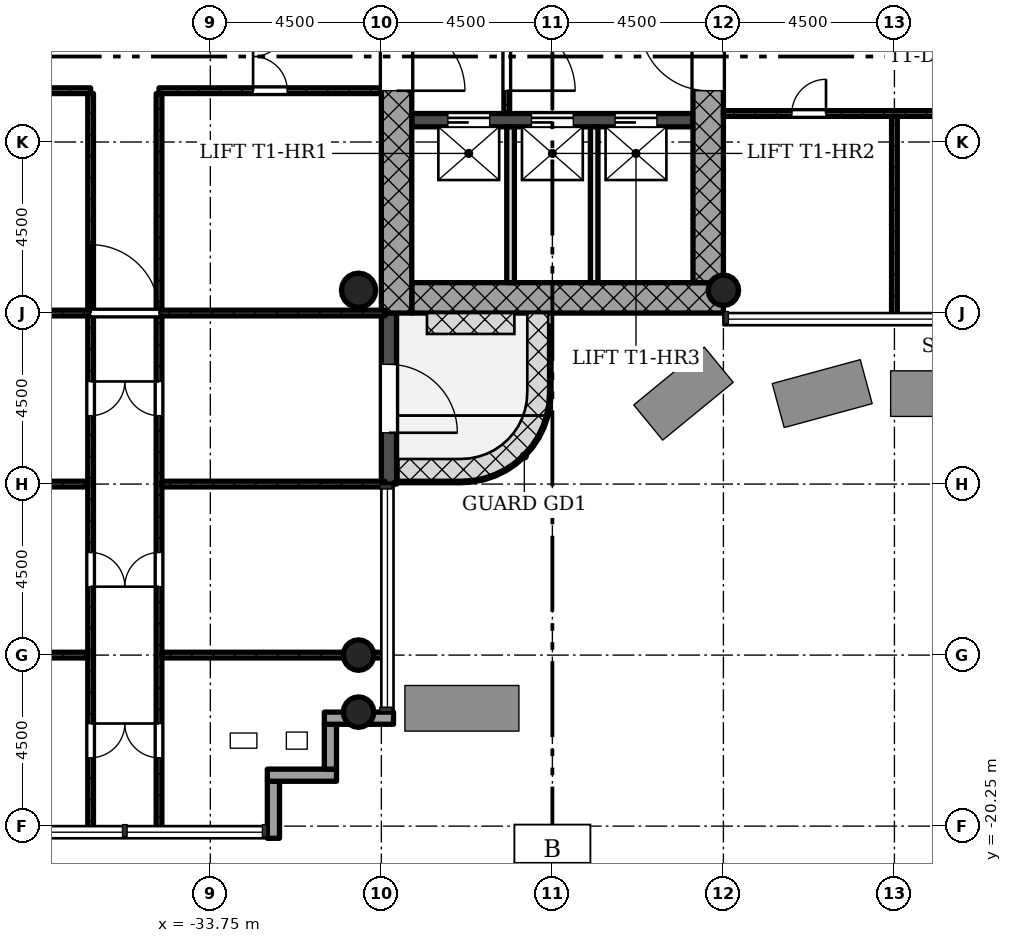
"""IFC4 building model, lengths in metres.
Left out: names, types, materials, properties, quantities, classifications, styles, units other than length and angle.
Written with IfcOpenShell. Run it as: python <this file> out.ifc"""

import sys

from ifc_helpers import new_model, si_unit, direction, frame, frame_2d, origin, origin_2d, place, context, subcontext, project, spatial, rectangle, hollow_circle, extrude, element, fill, save


model = new_model("IFC4")
c1 = context("Model", 3, precision=1e-05, world=origin(), true_north=direction((0.0, 1.0)))
c2 = subcontext(c1, "Body", "Model", "MODEL_VIEW")
j1 = project(units=[si_unit("LENGTHUNIT", "METRE"), si_unit("PLANEANGLEUNIT", "RADIAN")], contexts=[c1])
p1 = place(None, origin())
s1 = spatial("IfcSite", under=j1, at=p1, CompositionType="ELEMENT")
p2 = place(p1, origin())
s2 = spatial("IfcBuilding", under=s1, at=p2, CompositionType="ELEMENT")
p3 = place(p2, frame((0.0, 0.0, 128.7)))
s3 = spatial("IfcBuildingStorey", under=s2, at=p3, CompositionType="ELEMENT", Elevation=128.7)
p4 = place(p3, frame((-28.45, -6.35, 0.0), z_axis=(0.0, 0.0, 1.0), x_axis=(1.0, 0.0, 0.0)))
e1 = element("IfcWall", 1, at=p4, inside=s3, PredefinedType="SHEAR", context=c2, shape_type="SweptSolid", body=[
    extrude(rectangle(XDim=8.2, YDim=0.8, at=frame_2d((4.1, 0.0))), origin(), (0.0, 0.0, 1.0), 5.0),
])
p5 = place(p3, frame((-20.65, -5.95, 0.0), z_axis=(0.0, 0.0, 1.0), x_axis=(0.0, 1.0, 0.0)))
e2 = element("IfcWall", 2, at=p5, inside=s3, PredefinedType="SHEAR", context=c2, shape_type="SweptSolid", body=[
    extrude(rectangle(XDim=12.7, YDim=0.8, at=frame_2d((6.35, 0.0))), origin(), (0.0, 0.0, 1.0), 5.0),
])
p6 = place(p5, frame((5.05, 0.0, 0.0)))
e3 = element("IfcOpeningElement", 3, at=p6, cuts=e2, PredefinedType="OPENING", context=c2, shape_type="SweptSolid", body=[
    extrude(rectangle(XDim=1.8, YDim=2.1, at=frame_2d((0.9, 1.05))), frame((0.0, 0.41, 0.0), z_axis=(0.0, -1.0, 0.0), x_axis=(1.0, 0.0, 0.0)), (0.0, 0.0, 1.0), 0.82),
])
p7 = place(p3, frame((-28.85, 5.95, 0.0), z_axis=(0.0, 0.0, 1.0), x_axis=(0.0, -1.0, 0.0)))
e4 = element("IfcWall", 4, at=p7, inside=s3, PredefinedType="SHEAR", context=c2, shape_type="SweptSolid", body=[
    extrude(rectangle(XDim=12.7, YDim=0.8, at=frame_2d((6.35, 0.0))), origin(), (0.0, 0.0, 1.0), 5.0),
])
p8 = place(p7, frame((5.05, 0.0, 0.0)))
e5 = element("IfcOpeningElement", 5, at=p8, cuts=e4, PredefinedType="OPENING", context=c2, shape_type="SweptSolid", body=[
    extrude(rectangle(XDim=1.8, YDim=2.1, at=frame_2d((0.9, 1.05))), frame((0.0, 0.41, 0.0), z_axis=(0.0, -1.0, 0.0), x_axis=(1.0, 0.0, 0.0)), (0.0, 0.0, 1.0), 0.82),
])
p9 = place(p3, frame((-28.45, -1.675, 0.0), z_axis=(0.0, 0.0, 1.0), x_axis=(1.0, 0.0, 0.0)))
e6 = element("IfcWall", 6, at=p9, inside=s3, PredefinedType="SHEAR", context=c2, shape_type="SweptSolid", body=[
    extrude(rectangle(XDim=7.4, YDim=0.35, at=frame_2d((3.7, 0.0))), origin(), (0.0, 0.0, 1.0), 5.0),
])
p10 = place(p9, frame((0.95, 0.0, 0.0)))
e7 = element("IfcOpeningElement", 7, at=p10, cuts=e6, PredefinedType="OPENING", context=c2, shape_type="SweptSolid", body=[
    extrude(rectangle(XDim=1.1, YDim=2.1, at=frame_2d((0.55, 1.05))), frame((0.0, 0.185, 0.0), z_axis=(0.0, -1.0, 0.0), x_axis=(1.0, 0.0, 0.0)), (0.0, 0.0, 1.0), 0.37),
])
p11 = place(p9, frame((3.15, 0.0, 0.0)))
e8 = element("IfcOpeningElement", 8, at=p11, cuts=e6, PredefinedType="OPENING", context=c2, shape_type="SweptSolid", body=[
    extrude(rectangle(XDim=1.1, YDim=2.1, at=frame_2d((0.55, 1.05))), frame((0.0, 0.185, 0.0), z_axis=(0.0, -1.0, 0.0), x_axis=(1.0, 0.0, 0.0)), (0.0, 0.0, 1.0), 0.37),
])
p12 = place(p9, frame((5.35, 0.0, 0.0)))
e9 = element("IfcOpeningElement", 9, at=p12, cuts=e6, PredefinedType="OPENING", context=c2, shape_type="SweptSolid", body=[
    extrude(rectangle(XDim=1.1, YDim=2.1, at=frame_2d((0.55, 1.05))), frame((0.0, 0.185, 0.0), z_axis=(0.0, -1.0, 0.0), x_axis=(1.0, 0.0, 0.0)), (0.0, 0.0, 1.0), 0.37),
])
for number, where, z_axis, x_axis in (
    (10, (-20.25, -6.15, 0.0), (0.0, 0.0, 1.0), (1.0, 0.0, 0.0)),
    (11, (-29.85, -15.75, 0.0), (0.0, 0.0, 1.0), (1.0, 0.0, 0.0)),
    (12, (-29.85, -17.25, 0.0), (0.0, 0.0, 1.0), (1.0, 0.0, 0.0)),
):
    element("IfcColumn", number, at=place(p3, frame(where, z_axis=z_axis, x_axis=x_axis)), inside=s3, PredefinedType="COLUMN", context=c2, shape_type="SweptSolid", body=[
        extrude(hollow_circle(Radius=0.4, WallThickness=0.028, at=origin_2d()), origin(), (0.0, 0.0, 1.0), 5.0),
    ])
p13 = place(p3, frame((-29.85, -6.15, 0.0), z_axis=(0.0, 0.0, 1.0), x_axis=(1.0, 0.0, 0.0)))
e13 = element("IfcColumn", 13, at=p13, inside=s3, PredefinedType="COLUMN", context=c2, shape_type="SweptSolid", body=[
    extrude(hollow_circle(Radius=0.45, WallThickness=0.032, at=origin_2d()), origin(), (0.0, 0.0, 1.0), 5.0),
])
p14 = place(p3, frame((-32.09, -20.57, -0.3), z_axis=(0.0, 0.0, 1.0), x_axis=(0.0, 1.0, 0.0)))
e14 = element("IfcWall", 14, at=p14, inside=s3, PredefinedType="STANDARD", context=c2, shape_type="SweptSolid", body=[
    extrude(rectangle(XDim=1.5, YDim=0.32, at=frame_2d((0.75, 0.0))), origin(), (0.0, 0.0, 1.0), 5.0),
])
p15 = place(p3, frame((-32.25, -18.91, -0.3), z_axis=(0.0, 0.0, 1.0), x_axis=(1.0, 0.0, 0.0)))
e15 = element("IfcWall", 15, at=p15, inside=s3, PredefinedType="STANDARD", context=c2, shape_type="SweptSolid", body=[
    extrude(rectangle(XDim=1.82, YDim=0.32, at=frame_2d((0.91, 0.0))), origin(), (0.0, 0.0, 1.0), 5.0),
])
p16 = place(p3, frame((-30.59, -18.75, -0.3), z_axis=(0.0, 0.0, 1.0), x_axis=(0.0, 1.0, 0.0)))
e16 = element("IfcWall", 16, at=p16, inside=s3, PredefinedType="STANDARD", context=c2, shape_type="SweptSolid", body=[
    extrude(rectangle(XDim=1.18, YDim=0.32, at=frame_2d((0.59, 0.0))), origin(), (0.0, 0.0, 1.0), 5.0),
])
p17 = place(p3, frame((-30.75, -17.41, -0.3), z_axis=(0.0, 0.0, 1.0), x_axis=(1.0, 0.0, 0.0)))
e17 = element("IfcWall", 17, at=p17, inside=s3, PredefinedType="STANDARD", context=c2, shape_type="SweptSolid", body=[
    extrude(rectangle(XDim=1.82, YDim=0.32, at=frame_2d((0.91, 0.0))), origin(), (0.0, 0.0, 1.0), 5.0),
])
p18 = place(p3, frame((-29.05, -11.25, -0.02), z_axis=(0.0, 0.0, 1.0), x_axis=(0.0, 1.0, 0.0)))
e18 = element("IfcWall", 18, at=p18, inside=s3, PredefinedType="STANDARD", context=c2, shape_type="SweptSolid", body=[
    extrude(rectangle(XDim=4.5, YDim=0.4, at=frame_2d((2.25, 0.0))), origin(), (0.0, 0.0, 1.0), 4.72),
])
p19 = place(p18, frame((1.35, 0.0, 0.02)))
e19 = element("IfcOpeningElement", 19, at=p19, cuts=e18, PredefinedType="OPENING", context=c2, shape_type="SweptSolid", body=[
    extrude(rectangle(XDim=1.8, YDim=2.1, at=frame_2d((0.9, 1.05))), frame((0.0, 0.21, 0.0), z_axis=(0.0, -1.0, 0.0), x_axis=(1.0, 0.0, 0.0)), (0.0, 0.0, 1.0), 0.42),
])
p20 = place(p3, frame((-25.95, -1.5, 0.0), z_axis=(0.0, 0.0, 1.0), x_axis=(0.0, 1.0, 0.0)))
e20 = element("IfcWall", 20, at=p20, inside=s3, PredefinedType="PARTITIONING", context=c2, shape_type="SweptSolid", body=[
    extrude(rectangle(XDim=3.0, YDim=0.15, at=frame_2d((1.5, 0.0))), origin(), (0.0, 0.0, 1.0), 4.58),
])
p21 = place(p20, frame((0.6, 0.0, 0.0)))
e21 = element("IfcOpeningElement", 21, at=p21, cuts=e20, PredefinedType="OPENING", context=c2, shape_type="SweptSolid", body=[
    extrude(rectangle(XDim=1.8, YDim=2.1, at=frame_2d((0.9, 1.05))), frame((0.0, 0.085, 0.0), z_axis=(0.0, -1.0, 0.0), x_axis=(1.0, 0.0, 0.0)), (0.0, 0.0, 1.0), 0.17),
])
for number, where, z_axis, x_axis in (
    (22, (-25.85, -5.95, 0.0), (0.0, 0.0, 1.0), (0.0, 1.0, 0.0)),
    (23, (-23.65, -5.95, 0.0), (0.0, 0.0, 1.0), (0.0, 1.0, 0.0)),
):
    element("IfcWall", number, at=place(p3, frame(where, z_axis=z_axis, x_axis=x_axis)), inside=s3, PredefinedType="SOLIDWALL", context=c2, shape_type="SweptSolid", body=[
        extrude(rectangle(XDim=4.1, YDim=0.2, at=frame_2d((2.05, 0.0))), origin(), (0.0, 0.0, 1.0), 4.58),
    ])
p22 = place(p3, frame((-35.1, -0.9, 0.0), z_axis=(0.0, 0.0, 1.0), x_axis=(1.0, 0.0, 0.0)))
e24 = element("IfcWall", 24, at=p22, inside=s3, PredefinedType="PARTITIONING", context=c2, shape_type="SweptSolid", body=[
    extrude(rectangle(XDim=5.85, YDim=0.15, at=frame_2d((2.925, 0.0))), origin(), (0.0, 0.0, 1.0), 4.58),
])
p23 = place(p22, frame((2.475, 0.0, 0.0)))
e25 = element("IfcOpeningElement", 25, at=p23, cuts=e24, PredefinedType="OPENING", context=c2, shape_type="SweptSolid", body=[
    extrude(rectangle(XDim=0.9, YDim=2.1, at=frame_2d((0.45, 1.05))), frame((0.0, 0.085, 0.0), z_axis=(0.0, -1.0, 0.0), x_axis=(1.0, 0.0, 0.0)), (0.0, 0.0, 1.0), 0.17),
])
p24 = place(p3, frame((-35.1, -6.675, 0.0), z_axis=(0.0, 0.0, 1.0), x_axis=(0.0, 1.0, 0.0)))
e26 = element("IfcWall", 26, at=p24, inside=s3, PredefinedType="PARTITIONING", context=c2, shape_type="SweptSolid", body=[
    extrude(rectangle(XDim=5.7, YDim=0.15, at=frame_2d((2.85, 0.0))), origin(), (0.0, 0.0, 1.0), 4.58),
])
p25 = place(p3, frame((-42.75, -0.9, 0.0), z_axis=(0.0, 0.0, 1.0), x_axis=(1.0, 0.0, 0.0)))
e27 = element("IfcWall", 27, at=p25, inside=s3, PredefinedType="PARTITIONING", context=c2, shape_type="SweptSolid", body=[
    extrude(rectangle(XDim=5.85, YDim=0.15, at=frame_2d((2.925, 0.0))), origin(), (0.0, 0.0, 1.0), 4.58),
])
p26 = place(p25, frame((2.475, 0.0, 0.0)))
e28 = element("IfcOpeningElement", 28, at=p26, cuts=e27, PredefinedType="OPENING", context=c2, shape_type="SweptSolid", body=[
    extrude(rectangle(XDim=0.9, YDim=2.1, at=frame_2d((0.45, 1.05))), frame((0.0, 0.085, 0.0), z_axis=(0.0, -1.0, 0.0), x_axis=(1.0, 0.0, 0.0)), (0.0, 0.0, 1.0), 0.17),
])
p27 = place(p3, frame((-36.9, -6.675, 0.0), z_axis=(0.0, 0.0, 1.0), x_axis=(0.0, 1.0, 0.0)))
e29 = element("IfcWall", 29, at=p27, inside=s3, PredefinedType="PARTITIONING", context=c2, shape_type="SweptSolid", body=[
    extrude(rectangle(XDim=5.7, YDim=0.15, at=frame_2d((2.85, 0.0))), origin(), (0.0, 0.0, 1.0), 4.58),
])
p28 = place(p3, frame((-20.25, -1.5, 0.0), z_axis=(0.0, 0.0, 1.0), x_axis=(1.0, 0.0, 0.0)))
e30 = element("IfcWall", 30, at=p28, inside=s3, PredefinedType="PARTITIONING", context=c2, shape_type="SweptSolid", body=[
    extrude(rectangle(XDim=9.1, YDim=0.15, at=frame_2d((4.55, 0.0))), origin(), (0.0, 0.0, 1.0), 4.58),
])
p29 = place(p28, frame((1.8, 0.0, 0.0)))
e31 = element("IfcOpeningElement", 31, at=p29, cuts=e30, PredefinedType="OPENING", context=c2, shape_type="SweptSolid", body=[
    extrude(rectangle(XDim=0.9, YDim=2.1, at=frame_2d((0.45, 1.05))), frame((0.0, 0.085, 0.0), z_axis=(0.0, -1.0, 0.0), x_axis=(1.0, 0.0, 0.0)), (0.0, 0.0, 1.0), 0.17),
])
p30 = place(p28, frame((6.3, 0.0, 0.0)))
e32 = element("IfcOpeningElement", 32, at=p30, cuts=e30, PredefinedType="OPENING", context=c2, shape_type="SweptSolid", body=[
    extrude(rectangle(XDim=0.9, YDim=2.1, at=frame_2d((0.45, 1.05))), frame((0.0, 0.085, 0.0), z_axis=(0.0, -1.0, 0.0), x_axis=(1.0, 0.0, 0.0)), (0.0, 0.0, 1.0), 0.17),
])
p31 = place(p3, frame((-15.75, -1.575, 0.0), z_axis=(0.0, 0.0, 1.0), x_axis=(0.0, -1.0, 0.0)))
e33 = element("IfcWall", 33, at=p31, inside=s3, PredefinedType="PARTITIONING", context=c2, shape_type="SweptSolid", body=[
    extrude(rectangle(XDim=5.275, YDim=0.15, at=frame_2d((2.638, 0.0))), origin(), (0.0, 0.0, 1.0), 4.58),
])
p32 = place(p3, frame((-42.85, -6.75, 0.0), z_axis=(0.0, 0.0, 1.0), x_axis=(1.0, 0.0, 0.0)))
e34 = element("IfcWall", 34, at=p32, inside=s3, PredefinedType="PARTITIONING", context=c2, shape_type="SweptSolid", body=[
    extrude(rectangle(XDim=13.7, YDim=0.15, at=frame_2d((6.85, 0.0))), origin(), (0.0, 0.0, 1.0), 4.58),
])
p33 = place(p32, frame((5.95, 0.0, 0.0)))
e35 = element("IfcOpeningElement", 35, at=p33, cuts=e34, PredefinedType="OPENING", context=c2, shape_type="SweptSolid", body=[
    extrude(rectangle(XDim=1.8, YDim=2.1, at=frame_2d((0.9, 1.05))), frame((0.0, 0.085, 0.0), z_axis=(0.0, -1.0, 0.0), x_axis=(1.0, 0.0, 0.0)), (0.0, 0.0, 1.0), 0.17),
])
p34 = place(p3, frame((-35.1, -20.35, 0.0), z_axis=(0.0, 0.0, 1.0), x_axis=(0.0, 1.0, 0.0)))
e36 = element("IfcWall", 36, at=p34, inside=s3, PredefinedType="PARTITIONING", context=c2, shape_type="SweptSolid", body=[
    extrude(rectangle(XDim=13.525, YDim=0.15, at=frame_2d((6.763, 0.0))), origin(), (0.0, 0.0, 1.0), 4.58),
])
p35 = place(p34, frame((1.9, 0.0, 0.0)))
e37 = element("IfcOpeningElement", 37, at=p35, cuts=e36, PredefinedType="OPENING", context=c2, shape_type="SweptSolid", body=[
    extrude(rectangle(XDim=0.9, YDim=2.1, at=frame_2d((0.45, 1.05))), frame((0.0, 0.085, 0.0), z_axis=(0.0, -1.0, 0.0), x_axis=(1.0, 0.0, 0.0)), (0.0, 0.0, 1.0), 0.17),
])
p36 = place(p34, frame((6.4, 0.0, 0.0)))
e38 = element("IfcOpeningElement", 38, at=p36, cuts=e36, PredefinedType="OPENING", context=c2, shape_type="SweptSolid", body=[
    extrude(rectangle(XDim=0.9, YDim=2.1, at=frame_2d((0.45, 1.05))), frame((0.0, 0.085, 0.0), z_axis=(0.0, -1.0, 0.0), x_axis=(1.0, 0.0, 0.0)), (0.0, 0.0, 1.0), 0.17),
])
p37 = place(p34, frame((10.9, 0.0, 0.0)))
e39 = element("IfcOpeningElement", 39, at=p37, cuts=e36, PredefinedType="OPENING", context=c2, shape_type="SweptSolid", body=[
    extrude(rectangle(XDim=0.9, YDim=2.1, at=frame_2d((0.45, 1.05))), frame((0.0, 0.085, 0.0), z_axis=(0.0, -1.0, 0.0), x_axis=(1.0, 0.0, 0.0)), (0.0, 0.0, 1.0), 0.17),
])
for number, where, z_axis, x_axis in (
    (40, (-35.025, -15.75, 0.0), (0.0, 0.0, 1.0), (1.0, 0.0, 0.0)),
    (41, (-35.025, -11.25, 0.0), (0.0, 0.0, 1.0), (1.0, 0.0, 0.0)),
):
    element("IfcWall", number, at=place(p3, frame(where, z_axis=z_axis, x_axis=x_axis)), inside=s3, PredefinedType="PARTITIONING", context=c2, shape_type="SweptSolid", body=[
        extrude(rectangle(XDim=5.875, YDim=0.15, at=frame_2d((2.938, 0.0))), origin(), (0.0, 0.0, 1.0), 4.58),
    ])
p38 = place(p3, frame((-36.9, -20.35, 0.0), z_axis=(0.0, 0.0, 1.0), x_axis=(0.0, 1.0, 0.0)))
e42 = element("IfcWall", 42, at=p38, inside=s3, PredefinedType="PARTITIONING", context=c2, shape_type="SweptSolid", body=[
    extrude(rectangle(XDim=13.525, YDim=0.15, at=frame_2d((6.763, 0.0))), origin(), (0.0, 0.0, 1.0), 4.58),
])
p39 = place(p38, frame((1.9, 0.0, 0.0)))
e43 = element("IfcOpeningElement", 43, at=p39, cuts=e42, PredefinedType="OPENING", context=c2, shape_type="SweptSolid", body=[
    extrude(rectangle(XDim=0.9, YDim=2.1, at=frame_2d((0.45, 1.05))), frame((0.0, 0.085, 0.0), z_axis=(0.0, -1.0, 0.0), x_axis=(1.0, 0.0, 0.0)), (0.0, 0.0, 1.0), 0.17),
])
p40 = place(p38, frame((6.4, 0.0, 0.0)))
e44 = element("IfcOpeningElement", 44, at=p40, cuts=e42, PredefinedType="OPENING", context=c2, shape_type="SweptSolid", body=[
    extrude(rectangle(XDim=0.9, YDim=2.1, at=frame_2d((0.45, 1.05))), frame((0.0, 0.085, 0.0), z_axis=(0.0, -1.0, 0.0), x_axis=(1.0, 0.0, 0.0)), (0.0, 0.0, 1.0), 0.17),
])
p41 = place(p38, frame((10.9, 0.0, 0.0)))
e45 = element("IfcOpeningElement", 45, at=p41, cuts=e42, PredefinedType="OPENING", context=c2, shape_type="SweptSolid", body=[
    extrude(rectangle(XDim=0.9, YDim=2.1, at=frame_2d((0.45, 1.05))), frame((0.0, 0.085, 0.0), z_axis=(0.0, -1.0, 0.0), x_axis=(1.0, 0.0, 0.0)), (0.0, 0.0, 1.0), 0.17),
])
for number, where, z_axis, x_axis in (
    (46, (-36.975, -15.75, 0.0), (0.0, 0.0, 1.0), (-1.0, 0.0, 0.0)),
    (47, (-36.975, -11.25, 0.0), (0.0, 0.0, 1.0), (-1.0, 0.0, 0.0)),
):
    element("IfcWall", number, at=place(p3, frame(where, z_axis=z_axis, x_axis=x_axis)), inside=s3, PredefinedType="PARTITIONING", context=c2, shape_type="SweptSolid", body=[
        extrude(rectangle(XDim=5.875, YDim=0.15, at=frame_2d((2.938, 0.0))), origin(), (0.0, 0.0, 1.0), 4.58),
    ])
p42 = place(p19, origin())
e48 = element("IfcDoor", 48, at=p42, inside=s3, OperationType="SINGLE_SWING_LEFT", PredefinedType="DOOR", context=c2, shape_type="SweptSolid", body=[
    extrude(rectangle(XDim=1.8, YDim=2.1, at=frame_2d((0.9, 1.05))), frame((0.0, 0.025, 0.0), z_axis=(0.0, -1.0, 0.0), x_axis=(1.0, 0.0, 0.0)), (0.0, 0.0, 1.0), 0.05),
])
fill(e19, e48)
p43 = place(p21, origin())
e49 = element("IfcDoor", 49, at=p43, inside=s3, OperationType="SINGLE_SWING_LEFT", PredefinedType="DOOR", context=c2, shape_type="SweptSolid", body=[
    extrude(rectangle(XDim=1.8, YDim=2.1, at=frame_2d((0.9, 1.05))), frame((0.0, 0.025, 0.0), z_axis=(0.0, -1.0, 0.0), x_axis=(1.0, 0.0, 0.0)), (0.0, 0.0, 1.0), 0.05),
])
fill(e21, e49)
p44 = place(p23, origin())
e50 = element("IfcDoor", 50, at=p44, inside=s3, OperationType="SINGLE_SWING_RIGHT", PredefinedType="DOOR", context=c2, shape_type="SweptSolid", body=[
    extrude(rectangle(XDim=0.9, YDim=2.1, at=frame_2d((0.45, 1.05))), frame((0.0, 0.025, 0.0), z_axis=(0.0, -1.0, 0.0), x_axis=(1.0, 0.0, 0.0)), (0.0, 0.0, 1.0), 0.05),
])
fill(e25, e50)
p45 = place(p29, origin())
e51 = element("IfcDoor", 51, at=p45, inside=s3, OperationType="SINGLE_SWING_LEFT", PredefinedType="DOOR", context=c2, shape_type="SweptSolid", body=[
    extrude(rectangle(XDim=0.9, YDim=2.1, at=frame_2d((0.45, 1.05))), frame((0.0, 0.025, 0.0), z_axis=(0.0, -1.0, 0.0), x_axis=(1.0, 0.0, 0.0)), (0.0, 0.0, 1.0), 0.05),
])
fill(e31, e51)
p46 = place(p33, origin())
e52 = element("IfcDoor", 52, at=p46, inside=s3, OperationType="SINGLE_SWING_RIGHT", PredefinedType="DOOR", context=c2, shape_type="SweptSolid", body=[
    extrude(rectangle(XDim=1.8, YDim=2.1, at=frame_2d((0.9, 1.05))), frame((0.0, 0.025, 0.0), z_axis=(0.0, -1.0, 0.0), x_axis=(1.0, 0.0, 0.0)), (0.0, 0.0, 1.0), 0.05),
])
fill(e35, e52)
p47 = place(p35, origin())
e53 = element("IfcDoor", 53, at=p47, inside=s3, OperationType="SINGLE_SWING_LEFT", PredefinedType="DOOR", context=c2, shape_type="SweptSolid", body=[
    extrude(rectangle(XDim=0.9, YDim=2.1, at=frame_2d((0.45, 1.05))), frame((0.0, 0.025, 0.0), z_axis=(0.0, -1.0, 0.0), x_axis=(1.0, 0.0, 0.0)), (0.0, 0.0, 1.0), 0.05),
])
fill(e37, e53)
p48 = place(p36, origin())
e54 = element("IfcDoor", 54, at=p48, inside=s3, OperationType="SINGLE_SWING_RIGHT", PredefinedType="DOOR", context=c2, shape_type="SweptSolid", body=[
    extrude(rectangle(XDim=0.9, YDim=2.1, at=frame_2d((0.45, 1.05))), frame((0.0, 0.025, 0.0), z_axis=(0.0, -1.0, 0.0), x_axis=(1.0, 0.0, 0.0)), (0.0, 0.0, 1.0), 0.05),
])
fill(e38, e54)
p49 = place(p37, origin())
e55 = element("IfcDoor", 55, at=p49, inside=s3, OperationType="SINGLE_SWING_LEFT", PredefinedType="DOOR", context=c2, shape_type="SweptSolid", body=[
    extrude(rectangle(XDim=0.9, YDim=2.1, at=frame_2d((0.45, 1.05))), frame((0.0, 0.025, 0.0), z_axis=(0.0, -1.0, 0.0), x_axis=(1.0, 0.0, 0.0)), (0.0, 0.0, 1.0), 0.05),
])
fill(e39, e55)
p50 = place(p39, origin())
e56 = element("IfcDoor", 56, at=p50, inside=s3, OperationType="SINGLE_SWING_RIGHT", PredefinedType="DOOR", context=c2, shape_type="SweptSolid", body=[
    extrude(rectangle(XDim=0.9, YDim=2.1, at=frame_2d((0.45, 1.05))), frame((0.0, 0.025, 0.0), z_axis=(0.0, -1.0, 0.0), x_axis=(1.0, 0.0, 0.0)), (0.0, 0.0, 1.0), 0.05),
])
fill(e43, e56)
p51 = place(p40, origin())
e57 = element("IfcDoor", 57, at=p51, inside=s3, OperationType="SINGLE_SWING_LEFT", PredefinedType="DOOR", context=c2, shape_type="SweptSolid", body=[
    extrude(rectangle(XDim=0.9, YDim=2.1, at=frame_2d((0.45, 1.05))), frame((0.0, 0.025, 0.0), z_axis=(0.0, -1.0, 0.0), x_axis=(1.0, 0.0, 0.0)), (0.0, 0.0, 1.0), 0.05),
])
fill(e44, e57)
p52 = place(p41, origin())
e58 = element("IfcDoor", 58, at=p52, inside=s3, OperationType="SINGLE_SWING_RIGHT", PredefinedType="DOOR", context=c2, shape_type="SweptSolid", body=[
    extrude(rectangle(XDim=0.9, YDim=2.1, at=frame_2d((0.45, 1.05))), frame((0.0, 0.025, 0.0), z_axis=(0.0, -1.0, 0.0), x_axis=(1.0, 0.0, 0.0)), (0.0, 0.0, 1.0), 0.05),
])
fill(e45, e58)
p53 = place(p10, origin())
e59 = element("IfcDoor", 59, at=p53, inside=s3, OperationType="SLIDING_TO_LEFT", PredefinedType="DOOR", context=c2, shape_type="SweptSolid", body=[
    extrude(rectangle(XDim=1.1, YDim=2.1, at=frame_2d((0.55, 1.05))), frame((0.0, 0.025, 0.0), z_axis=(0.0, -1.0, 0.0), x_axis=(1.0, 0.0, 0.0)), (0.0, 0.0, 1.0), 0.05),
])
fill(e7, e59)
p54 = place(p11, origin())
e60 = element("IfcDoor", 60, at=p54, inside=s3, OperationType="SLIDING_TO_LEFT", PredefinedType="DOOR", context=c2, shape_type="SweptSolid", body=[
    extrude(rectangle(XDim=1.1, YDim=2.1, at=frame_2d((0.55, 1.05))), frame((0.0, 0.025, 0.0), z_axis=(0.0, -1.0, 0.0), x_axis=(1.0, 0.0, 0.0)), (0.0, 0.0, 1.0), 0.05),
])
fill(e8, e60)
p55 = place(p12, origin())
e61 = element("IfcDoor", 61, at=p55, inside=s3, OperationType="SLIDING_TO_LEFT", PredefinedType="DOOR", context=c2, shape_type="SweptSolid", body=[
    extrude(rectangle(XDim=1.1, YDim=2.1, at=frame_2d((0.55, 1.05))), frame((0.0, 0.025, 0.0), z_axis=(0.0, -1.0, 0.0), x_axis=(1.0, 0.0, 0.0)), (0.0, 0.0, 1.0), 0.05),
])
fill(e9, e61)
p56 = place(p8, origin())
e62 = element("IfcDoor", 62, at=p56, inside=s3, OperationType="SINGLE_SWING_LEFT", PredefinedType="DOOR", context=c2, shape_type="SweptSolid", body=[
    extrude(rectangle(XDim=1.8, YDim=2.1, at=frame_2d((0.9, 1.05))), frame((0.0, 0.025, 0.0), z_axis=(0.0, -1.0, 0.0), x_axis=(1.0, 0.0, 0.0)), (0.0, 0.0, 1.0), 0.05),
])
fill(e5, e62)
p57 = place(p6, origin())
e63 = element("IfcDoor", 63, at=p57, inside=s3, OperationType="SINGLE_SWING_LEFT", PredefinedType="DOOR", context=c2, shape_type="SweptSolid", body=[
    extrude(rectangle(XDim=1.8, YDim=2.1, at=frame_2d((0.9, 1.05))), frame((0.0, 0.025, 0.0), z_axis=(0.0, -1.0, 0.0), x_axis=(1.0, 0.0, 0.0)), (0.0, 0.0, 1.0), 0.05),
])
fill(e3, e63)
save(model, sys.argv[1])
